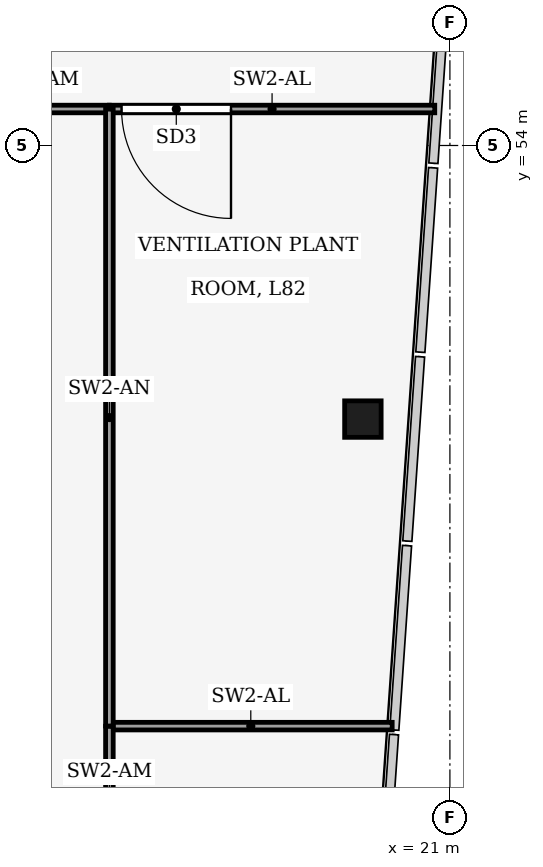
"""IFC4 building model, lengths in metres.
Left out: names, types, materials, properties, quantities, classifications, styles, units other than length and angle.
Written with IfcOpenShell. Run it as: python <this file> out.ifc"""

import sys

from ifc_helpers import new_model, si_unit, direction, frame, frame_2d, origin, origin_2d, place, context, subcontext, project, spatial, rectangle, hollow_rectangle, extrude, element, fill, save


model = new_model("IFC4")
c1 = context("Model", 3, precision=1e-05, world=origin(), true_north=direction((0.0, 1.0)))
c2 = subcontext(c1, "Body", "Model", "MODEL_VIEW")
j1 = project(units=[si_unit("LENGTHUNIT", "METRE"), si_unit("PLANEANGLEUNIT", "RADIAN")], contexts=[c1])
p1 = place(None, origin())
s1 = spatial("IfcSite", under=j1, at=p1, CompositionType="ELEMENT")
p2 = place(p1, origin())
s2 = spatial("IfcBuilding", under=s1, at=p2, CompositionType="ELEMENT")
p3 = place(p2, frame((0.0, 0.0, 364.0)))
s3 = spatial("IfcBuildingStorey", under=s2, at=p3, CompositionType="ELEMENT", Elevation=364.0)
p4 = place(p3, frame((19.569, 49.5, 0.0), z_axis=(0.0, 0.0, 1.0), x_axis=(1.0, 0.0, 0.0)))
e1 = element("IfcColumn", 1, at=p4, inside=s3, PredefinedType="COLUMN", context=c2, shape_type="SweptSolid", body=[
    extrude(hollow_rectangle(XDim=0.6, YDim=0.6, WallThickness=0.025, at=origin_2d()), origin(), (0.0, 0.0, 1.0), 4.0),
])
p5 = place(p3, frame((20.751, 54.6, 0.0), z_axis=(0.0, 0.0, 1.0), x_axis=(-1.0, 0.0, 0.0)))
e2 = element("IfcWall", 2, at=p5, inside=s3, PredefinedType="PARTITIONING", context=c2, shape_type="SweptSolid", body=[
    extrude(rectangle(XDim=5.351, YDim=0.125, at=frame_2d((2.675, 0.0))), origin(), (0.0, 0.0, 1.0), 3.02),
])
p6 = place(p5, frame((3.351, 0.0, 0.0)))
e3 = element("IfcOpeningElement", 3, at=p6, cuts=e2, PredefinedType="OPENING", context=c2, shape_type="SweptSolid", body=[
    extrude(rectangle(XDim=1.8, YDim=2.4, at=frame_2d((0.9, 1.2))), frame((0.0, 0.073, 0.0), z_axis=(0.0, -1.0, 0.0), x_axis=(1.0, 0.0, 0.0)), (0.0, 0.0, 1.0), 0.145),
])
p7 = place(p3, frame((15.4, 44.45, 0.0), z_axis=(0.0, 0.0, 1.0), x_axis=(1.0, 0.0, 0.0)))
e4 = element("IfcWall", 4, at=p7, inside=s3, PredefinedType="PARTITIONING", context=c2, shape_type="SweptSolid", body=[
    extrude(rectangle(XDim=4.651, YDim=0.125, at=frame_2d((2.325, 0.0))), origin(), (0.0, 0.0, 1.0), 3.02),
])
p8 = place(p3, frame((15.398, 54.6, 0.0), z_axis=(0.0, 0.0, 1.0), x_axis=(-1.0, 0.0, 0.0)))
e5 = element("IfcWall", 5, at=p8, inside=s3, PredefinedType="PARTITIONING", context=c2, shape_type="SweptSolid", body=[
    extrude(rectangle(XDim=2.398, YDim=0.125, at=frame_2d((1.199, 0.0))), origin(), (0.0, 0.0, 1.0), 3.85),
])
p9 = place(p3, frame((15.4, 42.002, 0.0), z_axis=(0.0, 0.0, 1.0), x_axis=(0.0, 1.0, 0.0)))
e6 = element("IfcWall", 6, at=p9, inside=s3, PredefinedType="PARTITIONING", context=c2, shape_type="SweptSolid", body=[
    extrude(rectangle(XDim=2.446, YDim=0.125, at=frame_2d((1.223, 0.0))), origin(), (0.0, 0.0, 1.0), 3.85),
])
p10 = place(p3, frame((15.4, 44.452, 0.0), z_axis=(0.0, 0.0, 1.0), x_axis=(0.0, 1.0, 0.0)))
e7 = element("IfcWall", 7, at=p10, inside=s3, PredefinedType="PARTITIONING", context=c2, shape_type="SweptSolid", body=[
    extrude(rectangle(XDim=10.146, YDim=0.125, at=frame_2d((5.073, 0.0))), origin(), (0.0, 0.0, 1.0), 3.33),
])
p11 = place(p6, origin())
e8 = element("IfcDoor", 8, at=p11, inside=s3, OperationType="DOUBLE_DOOR_SINGLE_SWING", PredefinedType="DOOR", context=c2, shape_type="SweptSolid", body=[
    extrude(rectangle(XDim=1.8, YDim=2.4, at=frame_2d((0.9, 1.2))), frame((0.0, 0.025, 0.0), z_axis=(0.0, -1.0, 0.0), x_axis=(1.0, 0.0, 0.0)), (0.0, 0.0, 1.0), 0.05),
])
fill(e3, e8)
save(model, sys.argv[1])
